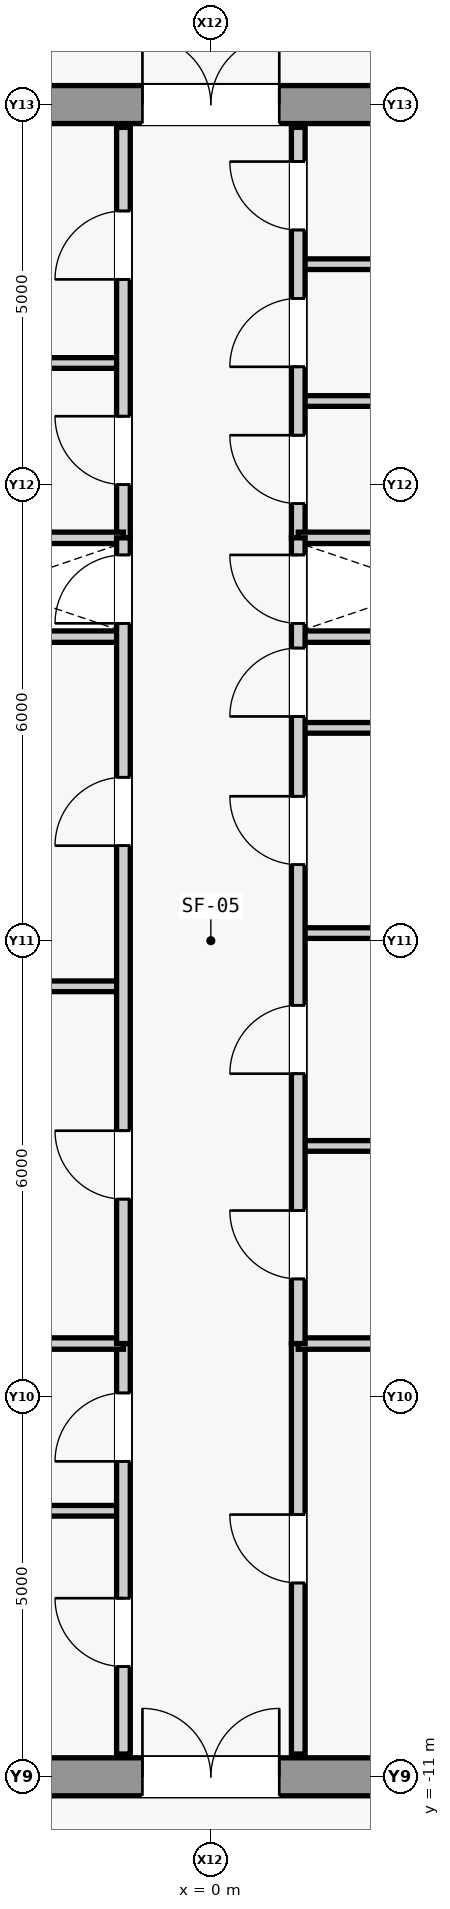
"""IFC4 building model, lengths in metres.
Left out: names, types, materials, properties, quantities, classifications, styles, units other than length and angle.
Written with IfcOpenShell. Run it as: python <this file> out.ifc"""

import sys

from ifc_helpers import new_model, si_unit, direction, frame, frame_2d, origin, place, context, subcontext, project, spatial, rectangle, extrude, source, transform, mapped, element, fill, save


model = new_model("IFC4")
c1 = context("Model", 3, precision=1e-05, world=origin(), true_north=direction((0.0, 1.0)))
c2 = subcontext(c1, "Body", "Model", "MODEL_VIEW")
j1 = project(units=[si_unit("LENGTHUNIT", "METRE"), si_unit("PLANEANGLEUNIT", "RADIAN")], contexts=[c1])
p1 = place(None, origin())
s1 = spatial("IfcSite", under=j1, at=p1, CompositionType="ELEMENT")
p2 = place(p1, origin())
s2 = spatial("IfcBuilding", under=s1, at=p2, CompositionType="ELEMENT")
p3 = place(p2, frame((0.0, 0.0, 394.7)))
s3 = spatial("IfcBuildingStorey", under=s2, at=p3, CompositionType="ELEMENT", Elevation=394.7)
m1 = source(origin(), c2, "Body", "SweptSolid", [
    extrude(rectangle(XDim=9.2, YDim=0.5, at=frame_2d((4.6, 0.0))), origin(), (0.0, 0.0, 1.0), 4.45),
])
p4 = place(p3, frame((-4.6, -11.0, 0.0), z_axis=(0.0, 0.0, 1.0), x_axis=(1.0, 0.0, 0.0)))
e1 = element("IfcWall", 1, at=p4, inside=s3, PredefinedType="SHEAR", context=c2, shape_type="MappedRepresentation", body=[
    mapped(m1, transform((0.0, 0.0, 0.0), scale=1.0)),
])
m2 = source(origin(), c2, "Body", "SweptSolid", [
    extrude(rectangle(XDim=1.8, YDim=2.25, at=frame_2d((0.9, 1.125))), frame((0.0, 0.26, 0.0), z_axis=(0.0, -1.0, 0.0), x_axis=(1.0, 0.0, 0.0)), (0.0, 0.0, 1.0), 0.52),
])
p5 = place(p4, frame((3.7, 0.0, 0.0)))
e2 = element("IfcOpeningElement", 2, at=p5, cuts=e1, PredefinedType="OPENING", context=c2, shape_type="MappedRepresentation", body=[
    mapped(m2, transform((0.0, 0.0, 0.0), scale=1.0)),
])
p6 = place(p3, frame((-4.6, 11.0, 0.0), z_axis=(0.0, 0.0, 1.0), x_axis=(1.0, 0.0, 0.0)))
e3 = element("IfcWall", 3, at=p6, inside=s3, PredefinedType="SHEAR", context=c2, shape_type="MappedRepresentation", body=[
    mapped(m1, transform((0.0, 0.0, 0.0), scale=1.0)),
])
p7 = place(p6, frame((3.7, 0.0, 0.0)))
e4 = element("IfcOpeningElement", 4, at=p7, cuts=e3, PredefinedType="OPENING", context=c2, shape_type="MappedRepresentation", body=[
    mapped(m2, transform((0.0, 0.0, 0.0), scale=1.0)),
])
m3 = source(origin(), c2, "Body", "SweptSolid", [
    extrude(rectangle(XDim=3.45, YDim=0.15, at=frame_2d((1.725, 0.0))), origin(), (0.0, 0.0, 1.0), 4.45),
])
for number, where, z_axis, x_axis in (
    (5, (-4.6, 4.0, 0.0), (0.0, 0.0, 1.0), (1.0, 0.0, 0.0)),
    (6, (1.15, 4.0, 0.0), (0.0, 0.0, 1.0), (1.0, 0.0, 0.0)),
):
    element("IfcWall", number, at=place(p3, frame(where, z_axis=z_axis, x_axis=x_axis)), inside=s3, PredefinedType="PARTITIONING", context=c2, shape_type="MappedRepresentation", body=[
        mapped(m3, transform((0.0, 0.0, 0.0), scale=1.0)),
    ])
m4 = source(origin(), c2, "Body", "SweptSolid", [
    extrude(rectangle(XDim=3.45, YDim=0.14, at=frame_2d((1.725, 0.0))), origin(), (0.0, 0.0, 1.0), 4.45),
])
p8 = place(p3, frame((-4.6, -7.5, 0.0), z_axis=(0.0, 0.0, 1.0), x_axis=(1.0, 0.0, 0.0)))
e7 = element("IfcWall", 7, at=p8, inside=s3, PredefinedType="PARTITIONING", context=c2, shape_type="MappedRepresentation", body=[
    mapped(m4, transform((0.0, 0.0, 0.0), scale=1.0)),
])
m5 = source(origin(), c2, "Body", "SweptSolid", [
    extrude(rectangle(XDim=5.4, YDim=0.18, at=frame_2d((2.7, 0.0))), origin(), (0.0, 0.0, 1.0), 4.45),
])
p9 = place(p3, frame((-1.15, -10.7, 0.0), z_axis=(0.0, 0.0, 1.0), x_axis=(0.0, 1.0, 0.0)))
e8 = element("IfcWall", 8, at=p9, inside=s3, PredefinedType="PARTITIONING", context=c2, shape_type="MappedRepresentation", body=[
    mapped(m5, transform((0.0, 0.0, 0.0), scale=1.0)),
])
m6 = source(origin(), c2, "Body", "SweptSolid", [
    extrude(rectangle(XDim=0.9, YDim=2.15, at=frame_2d((0.45, 1.075))), frame((0.0, 0.1, 0.0), z_axis=(0.0, -1.0, 0.0), x_axis=(1.0, 0.0, 0.0)), (0.0, 0.0, 1.0), 0.2),
])
p10 = place(p9, frame((1.15, 0.0, 0.0)))
e9 = element("IfcOpeningElement", 9, at=p10, cuts=e8, PredefinedType="OPENING", context=c2, shape_type="MappedRepresentation", body=[
    mapped(m6, transform((0.0, 0.0, 0.0), scale=1.0)),
])
p11 = place(p9, frame((3.85, 0.0, 0.0)))
e10 = element("IfcOpeningElement", 10, at=p11, cuts=e8, PredefinedType="OPENING", context=c2, shape_type="MappedRepresentation", body=[
    mapped(m6, transform((0.0, 0.0, 0.0), scale=1.0)),
])
p12 = place(p3, frame((1.15, -10.7, 0.0), z_axis=(0.0, 0.0, 1.0), x_axis=(0.0, 1.0, 0.0)))
e11 = element("IfcWall", 11, at=p12, inside=s3, PredefinedType="PARTITIONING", context=c2, shape_type="MappedRepresentation", body=[
    mapped(m5, transform((0.0, 0.0, 0.0), scale=1.0)),
])
p13 = place(p12, frame((2.25, 0.0, 0.0)))
e12 = element("IfcOpeningElement", 12, at=p13, cuts=e11, PredefinedType="OPENING", context=c2, shape_type="MappedRepresentation", body=[
    mapped(m6, transform((0.0, 0.0, 0.0), scale=1.0)),
])
for number, where, z_axis, x_axis in (
    (13, (-4.6, -5.3, 0.0), (0.0, 0.0, 1.0), (1.0, 0.0, 0.0)),
    (14, (1.15, -5.3, 0.0), (0.0, 0.0, 1.0), (1.0, 0.0, 0.0)),
):
    element("IfcWall", number, at=place(p3, frame(where, z_axis=z_axis, x_axis=x_axis)), inside=s3, PredefinedType="PARTITIONING", context=c2, shape_type="MappedRepresentation", body=[
        mapped(m3, transform((0.0, 0.0, 0.0), scale=1.0)),
    ])
p14 = place(p3, frame((-4.6, 7.6, 0.0), z_axis=(0.0, 0.0, 1.0), x_axis=(1.0, 0.0, 0.0)))
e15 = element("IfcWall", 15, at=p14, inside=s3, PredefinedType="PARTITIONING", context=c2, shape_type="MappedRepresentation", body=[
    mapped(m4, transform((0.0, 0.0, 0.0), scale=1.0)),
])
p15 = place(p3, frame((-1.15, 5.3, 0.0), z_axis=(0.0, 0.0, 1.0), x_axis=(0.0, 1.0, 0.0)))
e16 = element("IfcWall", 16, at=p15, inside=s3, PredefinedType="PARTITIONING", context=c2, shape_type="MappedRepresentation", body=[
    mapped(m5, transform((0.0, 0.0, 0.0), scale=1.0)),
])
p16 = place(p15, frame((0.7, 0.0, 0.0)))
e17 = element("IfcOpeningElement", 17, at=p16, cuts=e16, PredefinedType="OPENING", context=c2, shape_type="MappedRepresentation", body=[
    mapped(m6, transform((0.0, 0.0, 0.0), scale=1.0)),
])
p17 = place(p15, frame((3.4, 0.0, 0.0)))
e18 = element("IfcOpeningElement", 18, at=p17, cuts=e16, PredefinedType="OPENING", context=c2, shape_type="MappedRepresentation", body=[
    mapped(m6, transform((0.0, 0.0, 0.0), scale=1.0)),
])
for number, where, z_axis, x_axis in (
    (19, (1.15, 7.1, 0.0), (0.0, 0.0, 1.0), (1.0, 0.0, 0.0)),
    (20, (1.15, 8.9, 0.0), (0.0, 0.0, 1.0), (1.0, 0.0, 0.0)),
):
    element("IfcWall", number, at=place(p3, frame(where, z_axis=z_axis, x_axis=x_axis)), inside=s3, PredefinedType="PARTITIONING", context=c2, shape_type="MappedRepresentation", body=[
        mapped(m4, transform((0.0, 0.0, 0.0), scale=1.0)),
    ])
p18 = place(p3, frame((1.15, 5.3, 0.0), z_axis=(0.0, 0.0, 1.0), x_axis=(0.0, 1.0, 0.0)))
e21 = element("IfcWall", 21, at=p18, inside=s3, PredefinedType="PARTITIONING", context=c2, shape_type="MappedRepresentation", body=[
    mapped(m5, transform((0.0, 0.0, 0.0), scale=1.0)),
])
p19 = place(p18, frame((0.45, 0.0, 0.0)))
e22 = element("IfcOpeningElement", 22, at=p19, cuts=e21, PredefinedType="OPENING", context=c2, shape_type="MappedRepresentation", body=[
    mapped(m6, transform((0.0, 0.0, 0.0), scale=1.0)),
])
p20 = place(p18, frame((2.25, 0.0, 0.0)))
e23 = element("IfcOpeningElement", 23, at=p20, cuts=e21, PredefinedType="OPENING", context=c2, shape_type="MappedRepresentation", body=[
    mapped(m6, transform((0.0, 0.0, 0.0), scale=1.0)),
])
p21 = place(p18, frame((4.05, 0.0, 0.0)))
e24 = element("IfcOpeningElement", 24, at=p21, cuts=e21, PredefinedType="OPENING", context=c2, shape_type="MappedRepresentation", body=[
    mapped(m6, transform((0.0, 0.0, 0.0), scale=1.0)),
])
for number, where, z_axis, x_axis in (
    (25, (-4.6, 5.3, 0.0), (0.0, 0.0, 1.0), (1.0, 0.0, 0.0)),
    (26, (1.15, 5.3, 0.0), (0.0, 0.0, 1.0), (1.0, 0.0, 0.0)),
):
    element("IfcWall", number, at=place(p3, frame(where, z_axis=z_axis, x_axis=x_axis)), inside=s3, PredefinedType="PARTITIONING", context=c2, shape_type="MappedRepresentation", body=[
        mapped(m3, transform((0.0, 0.0, 0.0), scale=1.0)),
    ])
p22 = place(p3, frame((-4.6, -0.6, 0.0), z_axis=(0.0, 0.0, 1.0), x_axis=(1.0, 0.0, 0.0)))
e27 = element("IfcWall", 27, at=p22, inside=s3, PredefinedType="PARTITIONING", context=c2, shape_type="MappedRepresentation", body=[
    mapped(m4, transform((0.0, 0.0, 0.0), scale=1.0)),
])
m7 = source(origin(), c2, "Body", "SweptSolid", [
    extrude(rectangle(XDim=10.6, YDim=0.18, at=frame_2d((5.3, 0.0))), origin(), (0.0, 0.0, 1.0), 4.45),
])
p23 = place(p3, frame((-1.15, -5.3, 0.0), z_axis=(0.0, 0.0, 1.0), x_axis=(0.0, 1.0, 0.0)))
e28 = element("IfcWall", 28, at=p23, inside=s3, PredefinedType="PARTITIONING", context=c2, shape_type="MappedRepresentation", body=[
    mapped(m7, transform((0.0, 0.0, 0.0), scale=1.0)),
])
p24 = place(p23, frame((1.9, 0.0, 0.0)))
e29 = element("IfcOpeningElement", 29, at=p24, cuts=e28, PredefinedType="OPENING", context=c2, shape_type="MappedRepresentation", body=[
    mapped(m6, transform((0.0, 0.0, 0.0), scale=1.0)),
])
p25 = place(p23, frame((6.55, 0.0, 0.0)))
e30 = element("IfcOpeningElement", 30, at=p25, cuts=e28, PredefinedType="OPENING", context=c2, shape_type="MappedRepresentation", body=[
    mapped(m6, transform((0.0, 0.0, 0.0), scale=1.0)),
])
p26 = place(p23, frame((9.475, 0.0, 0.0)))
e31 = element("IfcOpeningElement", 31, at=p26, cuts=e28, PredefinedType="OPENING", context=c2, shape_type="MappedRepresentation", body=[
    mapped(m6, transform((0.0, 0.0, 0.0), scale=1.0)),
])
p27 = place(p3, frame((1.15, -2.7, 0.0), z_axis=(0.0, 0.0, 1.0), x_axis=(1.0, 0.0, 0.0)))
e32 = element("IfcWall", 32, at=p27, inside=s3, PredefinedType="PARTITIONING", context=c2, shape_type="MappedRepresentation", body=[
    mapped(m4, transform((0.0, 0.0, 0.0), scale=1.0)),
])
m8 = source(origin(), c2, "Body", "SweptSolid", [
    extrude(rectangle(XDim=3.45, YDim=0.14, at=frame_2d((1.725, 0.0))), origin(), (0.0, 0.0, 1.0), 3.755),
])
p28 = place(p3, frame((1.15, 0.1, 0.0), z_axis=(0.0, 0.0, 1.0), x_axis=(1.0, 0.0, 0.0)))
e33 = element("IfcWall", 33, at=p28, inside=s3, PredefinedType="PARTITIONING", context=c2, shape_type="MappedRepresentation", body=[
    mapped(m8, transform((0.0, 0.0, 0.0), scale=1.0)),
])
p29 = place(p3, frame((1.15, 2.8, 0.0), z_axis=(0.0, 0.0, 1.0), x_axis=(1.0, 0.0, 0.0)))
e34 = element("IfcWall", 34, at=p29, inside=s3, PredefinedType="PARTITIONING", context=c2, shape_type="MappedRepresentation", body=[
    mapped(m4, transform((0.0, 0.0, 0.0), scale=1.0)),
])
p30 = place(p3, frame((1.15, -5.3, 0.0), z_axis=(0.0, 0.0, 1.0), x_axis=(0.0, 1.0, 0.0)))
e35 = element("IfcWall", 35, at=p30, inside=s3, PredefinedType="PARTITIONING", context=c2, shape_type="MappedRepresentation", body=[
    mapped(m7, transform((0.0, 0.0, 0.0), scale=1.0)),
])
p31 = place(p30, frame((0.85, 0.0, 0.0)))
e36 = element("IfcOpeningElement", 36, at=p31, cuts=e35, PredefinedType="OPENING", context=c2, shape_type="MappedRepresentation", body=[
    mapped(m6, transform((0.0, 0.0, 0.0), scale=1.0)),
])
p32 = place(p30, frame((3.55, 0.0, 0.0)))
e37 = element("IfcOpeningElement", 37, at=p32, cuts=e35, PredefinedType="OPENING", context=c2, shape_type="MappedRepresentation", body=[
    mapped(m6, transform((0.0, 0.0, 0.0), scale=1.0)),
])
p33 = place(p30, frame((6.3, 0.0, 0.0)))
e38 = element("IfcOpeningElement", 38, at=p33, cuts=e35, PredefinedType="OPENING", context=c2, shape_type="MappedRepresentation", body=[
    mapped(m6, transform((0.0, 0.0, 0.0), scale=1.0)),
])
p34 = place(p30, frame((8.25, 0.0, 0.0)))
e39 = element("IfcOpeningElement", 39, at=p34, cuts=e35, PredefinedType="OPENING", context=c2, shape_type="MappedRepresentation", body=[
    mapped(m6, transform((0.0, 0.0, 0.0), scale=1.0)),
])
p35 = place(p30, frame((9.475, 0.0, 0.0)))
e40 = element("IfcOpeningElement", 40, at=p35, cuts=e35, PredefinedType="OPENING", context=c2, shape_type="MappedRepresentation", body=[
    mapped(m6, transform((0.0, 0.0, 0.0), scale=1.0)),
])
m9 = source(origin(), c2, "Body", "SweptSolid", [
    extrude(rectangle(XDim=0.9, YDim=2.15, at=frame_2d((0.45, 1.075))), frame((0.0, 0.025, 0.0), z_axis=(0.0, -1.0, 0.0), x_axis=(1.0, 0.0, 0.0)), (0.0, 0.0, 1.0), 0.05),
])
p36 = place(p10, origin())
e41 = element("IfcDoor", 41, at=p36, inside=s3, OperationType="SINGLE_SWING_RIGHT", PredefinedType="DOOR", context=c2, shape_type="MappedRepresentation", body=[
    mapped(m9, transform((0.0, 0.0, 0.0), scale=1.0)),
])
fill(e9, e41)
p37 = place(p11, origin())
e42 = element("IfcDoor", 42, at=p37, inside=s3, OperationType="SINGLE_SWING_LEFT", PredefinedType="DOOR", context=c2, shape_type="MappedRepresentation", body=[
    mapped(m9, transform((0.0, 0.0, 0.0), scale=1.0)),
])
fill(e10, e42)
p38 = place(p13, origin())
e43 = element("IfcDoor", 43, at=p38, inside=s3, OperationType="SINGLE_SWING_RIGHT", PredefinedType="DOOR", context=c2, shape_type="MappedRepresentation", body=[
    mapped(m9, transform((0.0, 0.0, 0.0), scale=1.0)),
])
fill(e12, e43)
m10 = source(origin(), c2, "Body", "SweptSolid", [
    extrude(rectangle(XDim=1.8, YDim=2.25, at=frame_2d((0.9, 1.125))), frame((0.0, 0.025, 0.0), z_axis=(0.0, -1.0, 0.0), x_axis=(1.0, 0.0, 0.0)), (0.0, 0.0, 1.0), 0.05),
])
p39 = place(p5, origin())
e44 = element("IfcDoor", 44, at=p39, inside=s3, OperationType="SINGLE_SWING_LEFT", PredefinedType="DOOR", context=c2, shape_type="MappedRepresentation", body=[
    mapped(m10, transform((0.0, 0.0, 0.0), scale=1.0)),
])
fill(e2, e44)
p40 = place(p16, origin())
e45 = element("IfcDoor", 45, at=p40, inside=s3, OperationType="SINGLE_SWING_RIGHT", PredefinedType="DOOR", context=c2, shape_type="MappedRepresentation", body=[
    mapped(m9, transform((0.0, 0.0, 0.0), scale=1.0)),
])
fill(e17, e45)
p41 = place(p17, origin())
e46 = element("IfcDoor", 46, at=p41, inside=s3, OperationType="SINGLE_SWING_LEFT", PredefinedType="DOOR", context=c2, shape_type="MappedRepresentation", body=[
    mapped(m9, transform((0.0, 0.0, 0.0), scale=1.0)),
])
fill(e18, e46)
p42 = place(p19, origin())
e47 = element("IfcDoor", 47, at=p42, inside=s3, OperationType="SINGLE_SWING_RIGHT", PredefinedType="DOOR", context=c2, shape_type="MappedRepresentation", body=[
    mapped(m9, transform((0.0, 0.0, 0.0), scale=1.0)),
])
fill(e22, e47)
p43 = place(p20, origin())
e48 = element("IfcDoor", 48, at=p43, inside=s3, OperationType="SINGLE_SWING_LEFT", PredefinedType="DOOR", context=c2, shape_type="MappedRepresentation", body=[
    mapped(m9, transform((0.0, 0.0, 0.0), scale=1.0)),
])
fill(e23, e48)
p44 = place(p21, origin())
e49 = element("IfcDoor", 49, at=p44, inside=s3, OperationType="SINGLE_SWING_RIGHT", PredefinedType="DOOR", context=c2, shape_type="MappedRepresentation", body=[
    mapped(m9, transform((0.0, 0.0, 0.0), scale=1.0)),
])
fill(e24, e49)
p45 = place(p7, origin())
e50 = element("IfcDoor", 50, at=p45, inside=s3, OperationType="SINGLE_SWING_RIGHT", PredefinedType="DOOR", context=c2, shape_type="MappedRepresentation", body=[
    mapped(m10, transform((0.0, 0.0, 0.0), scale=1.0)),
])
fill(e4, e50)
p46 = place(p24, origin())
e51 = element("IfcDoor", 51, at=p46, inside=s3, OperationType="SINGLE_SWING_RIGHT", PredefinedType="DOOR", context=c2, shape_type="MappedRepresentation", body=[
    mapped(m9, transform((0.0, 0.0, 0.0), scale=1.0)),
])
fill(e29, e51)
p47 = place(p25, origin())
e52 = element("IfcDoor", 52, at=p47, inside=s3, OperationType="SINGLE_SWING_LEFT", PredefinedType="DOOR", context=c2, shape_type="MappedRepresentation", body=[
    mapped(m9, transform((0.0, 0.0, 0.0), scale=1.0)),
])
fill(e30, e52)
p48 = place(p31, origin())
e53 = element("IfcDoor", 53, at=p48, inside=s3, OperationType="SINGLE_SWING_RIGHT", PredefinedType="DOOR", context=c2, shape_type="MappedRepresentation", body=[
    mapped(m9, transform((0.0, 0.0, 0.0), scale=1.0)),
])
fill(e36, e53)
p49 = place(p32, origin())
e54 = element("IfcDoor", 54, at=p49, inside=s3, OperationType="SINGLE_SWING_LEFT", PredefinedType="DOOR", context=c2, shape_type="MappedRepresentation", body=[
    mapped(m9, transform((0.0, 0.0, 0.0), scale=1.0)),
])
fill(e37, e54)
p50 = place(p33, origin())
e55 = element("IfcDoor", 55, at=p50, inside=s3, OperationType="SINGLE_SWING_RIGHT", PredefinedType="DOOR", context=c2, shape_type="MappedRepresentation", body=[
    mapped(m9, transform((0.0, 0.0, 0.0), scale=1.0)),
])
fill(e38, e55)
p51 = place(p34, origin())
e56 = element("IfcDoor", 56, at=p51, inside=s3, OperationType="SINGLE_SWING_LEFT", PredefinedType="DOOR", context=c2, shape_type="MappedRepresentation", body=[
    mapped(m9, transform((0.0, 0.0, 0.0), scale=1.0)),
])
fill(e39, e56)
p52 = place(p26, origin())
e57 = element("IfcDoor", 57, at=p52, inside=s3, OperationType="SINGLE_SWING_LEFT", PredefinedType="DOOR", context=c2, shape_type="MappedRepresentation", body=[
    mapped(m9, transform((0.0, 0.0, 0.0), scale=1.0)),
])
fill(e31, e57)
p53 = place(p35, origin())
e58 = element("IfcDoor", 58, at=p53, inside=s3, OperationType="SINGLE_SWING_RIGHT", PredefinedType="DOOR", context=c2, shape_type="MappedRepresentation", body=[
    mapped(m9, transform((0.0, 0.0, 0.0), scale=1.0)),
])
fill(e40, e58)
save(model, sys.argv[1])
